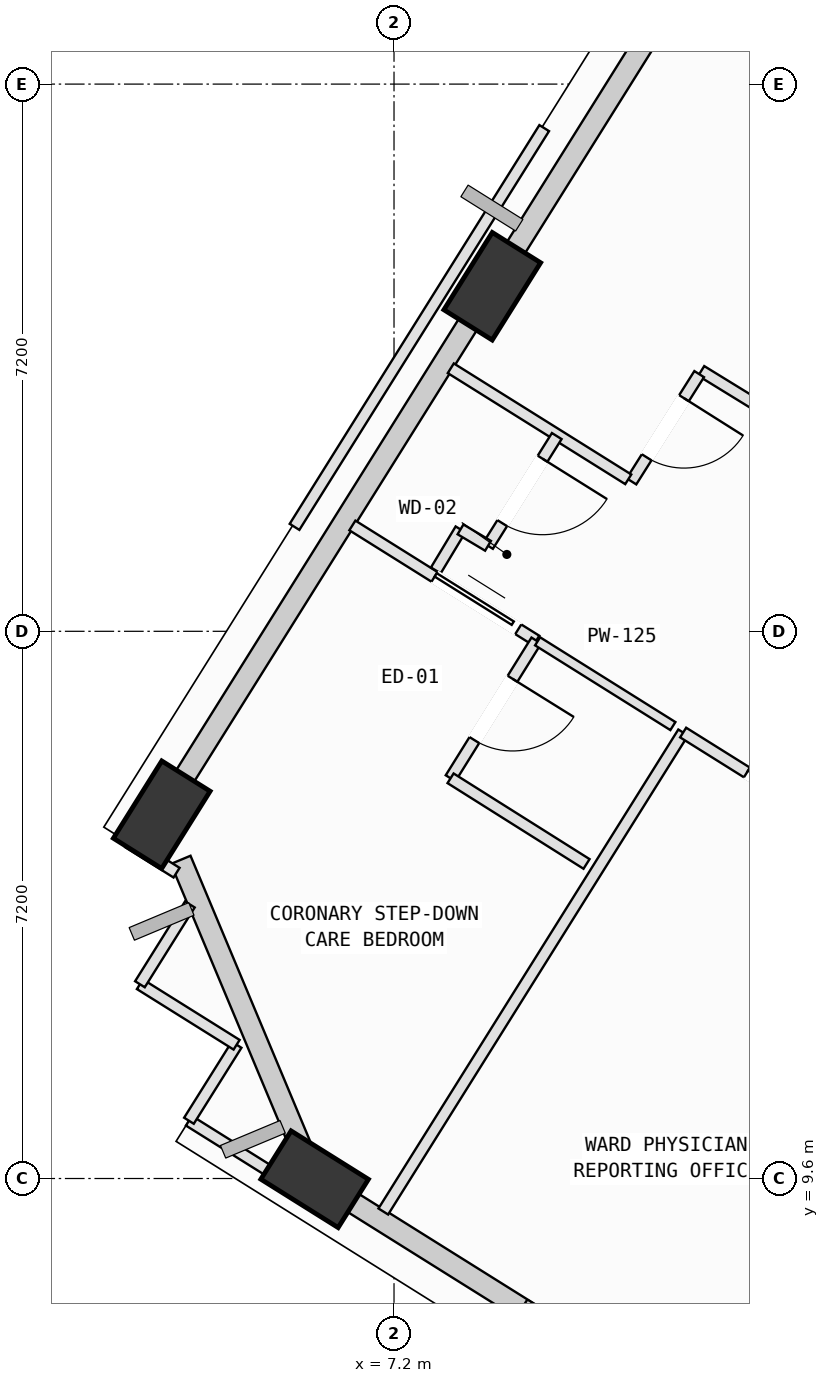
"""IFC4 building model, lengths in metres.
Left out: names, types, materials, properties, quantities, classifications, styles, units other than length and angle.
Written with IfcOpenShell. Run it as: python <this file> out.ifc"""

import sys

from ifc_helpers import new_model, si_unit, direction, frame, frame_2d, origin, origin_2d, place, context, subcontext, project, spatial, rectangle, extrude, element, fill, save


model = new_model("IFC4")
c1 = context("Model", 3, precision=1e-05, world=origin(), true_north=direction((0.0, 1.0)))
c2 = subcontext(c1, "Body", "Model", "MODEL_VIEW")
j1 = project(units=[si_unit("LENGTHUNIT", "METRE"), si_unit("PLANEANGLEUNIT", "RADIAN")], contexts=[c1])
p1 = place(None, origin())
s1 = spatial("IfcSite", under=j1, at=p1, CompositionType="ELEMENT")
p2 = place(p1, origin())
s2 = spatial("IfcBuilding", under=s1, at=p2, CompositionType="ELEMENT")
p3 = place(p2, frame((0.0, 0.0, 272.6)))
s3 = spatial("IfcBuildingStorey", under=s2, at=p3, CompositionType="ELEMENT", Elevation=272.6)
p4 = place(p3, frame((8.492, 21.34, 0.076), z_axis=(0.015107029766, -0.103396474218, 0.994525488246), x_axis=(0.403217157116, 0.910808249086, 0.088567813586)))
e1 = element("IfcColumn", 1, at=p4, inside=s3, PredefinedType="COLUMN", context=c2, shape_type="SweptSolid", body=[
    extrude(rectangle(XDim=1.2, YDim=0.75, at=origin_2d()), origin(), (0.0, 0.0, 1.0), 3.943),
])
p5 = place(p3, frame((4.144, 14.386, 0.093), z_axis=(0.043776072499, -0.120725231098, 0.991720259979), x_axis=(0.212333254316, 0.971116621815, 0.108844365708)))
e2 = element("IfcColumn", 2, at=p5, inside=s3, PredefinedType="COLUMN", context=c2, shape_type="SweptSolid", body=[
    extrude(rectangle(XDim=1.2, YDim=0.75, at=origin_2d()), origin(), (0.0, 0.0, 1.0), 3.938),
])
p6 = place(p3, frame((6.156, 9.59, 0.084), z_axis=(0.06340833724, -0.112341015051, 0.991644532635), x_axis=(-0.996784461674, 0.041648675863, 0.068455275645)))
e3 = element("IfcColumn", 3, at=p6, inside=s3, PredefinedType="COLUMN", context=c2, shape_type="SweptSolid", body=[
    extrude(rectangle(XDim=1.2, YDim=0.75, at=origin_2d()), origin(), (0.0, 0.0, 1.0), 3.947),
])
p7 = place(p3, frame((8.604, 21.529, 0.0), z_axis=(0.0, 0.0, 1.0), x_axis=(0.530668867354, 0.847579231235, 0.0)))
e4 = element("IfcWall", 4, at=p7, inside=s3, PredefinedType="SOLIDWALL", context=c2, shape_type="SweptSolid", body=[
    extrude(rectangle(XDim=7.434, YDim=0.28, at=frame_2d((3.717, 0.0))), origin(), (0.0, 0.0, 1.0), 3.265),
])
p8 = place(p3, frame((4.236, 14.552, 0.0), z_axis=(0.0, 0.0, 1.0), x_axis=(0.530664333184, 0.847582070059, 0.0)))
e5 = element("IfcWall", 5, at=p8, inside=s3, PredefinedType="SOLIDWALL", context=c2, shape_type="SweptSolid", body=[
    extrude(rectangle(XDim=7.485, YDim=0.28, at=frame_2d((3.742, 0.0))), origin(), (0.0, 0.0, 1.0), 3.265),
])
p9 = place(p3, frame((6.097, 9.727, 0.0), z_axis=(0.0, 0.0, 1.0), x_axis=(-0.386419734829, 0.922323039143, 0.0)))
e6 = element("IfcWall", 6, at=p9, inside=s3, PredefinedType="SOLIDWALL", context=c2, shape_type="SweptSolid", body=[
    extrude(rectangle(XDim=4.408, YDim=0.28, at=frame_2d((2.204, 0.0))), origin(), (0.0, 0.0, 1.0), 3.265),
])
p10 = place(p3, frame((11.606, 6.184, 0.0), z_axis=(0.0, 0.0, 1.0), x_axis=(-0.847576941241, 0.530672524893, 0.0)))
e7 = element("IfcWall", 7, at=p10, inside=s3, PredefinedType="SOLIDWALL", context=c2, shape_type="SweptSolid", body=[
    extrude(rectangle(XDim=5.83, YDim=0.28, at=frame_2d((2.915, 0.0))), origin(), (0.0, 0.0, 1.0), 2.765),
])
p11 = place(p10, frame((2.015, 0.0, 0.75)))
e8 = element("IfcOpeningElement", 8, at=p11, cuts=e7, PredefinedType="OPENING", context=c2, shape_type="SweptSolid", body=[
    extrude(rectangle(XDim=1.2, YDim=1.75, at=frame_2d((0.6, 0.875))), frame((0.0, 0.15, 0.0), z_axis=(0.0, -1.0, 0.0), x_axis=(1.0, 0.0, 0.0)), (0.0, 0.0, 1.0), 0.3),
])
p12 = place(p3, frame((7.059, 9.166, 0.0), z_axis=(0.0, 0.0, 1.0), x_axis=(0.530586195895, 0.847630986176, 0.0)))
e9 = element("IfcWall", 9, at=p12, inside=s3, PredefinedType="PARTITIONING", context=c2, shape_type="SweptSolid", body=[
    extrude(rectangle(XDim=7.435, YDim=0.15, at=frame_2d((3.717, 0.0))), origin(), (0.0, 0.0, 1.0), 3.415),
])
p13 = place(p3, frame((11.004, 15.468, 0.0), z_axis=(0.0, 0.0, 1.0), x_axis=(0.847668872786, -0.530525665836, 0.0)))
e10 = element("IfcWall", 10, at=p13, inside=s3, PredefinedType="PARTITIONING", context=c2, shape_type="SweptSolid", body=[
    extrude(rectangle(XDim=3.374, YDim=0.15, at=frame_2d((1.687, 0.0))), origin(), (0.0, 0.0, 1.0), 3.78),
])
p14 = place(p13, frame((0.99, 0.0, 0.0)))
e11 = element("IfcOpeningElement", 11, at=p14, cuts=e10, PredefinedType="OPENING", context=c2, shape_type="SweptSolid", body=[
    extrude(rectangle(XDim=1.2, YDim=2.15, at=frame_2d((0.6, 1.075))), frame((0.0, 0.085, 0.0), z_axis=(0.0, -1.0, 0.0), x_axis=(1.0, 0.0, 0.0)), (0.0, 0.0, 1.0), 0.17),
])
p15 = place(p3, frame((4.339, 13.624, 0.0), z_axis=(0.0, 0.0, 1.0), x_axis=(-0.847357103452, 0.531023482748, 0.0)))
e12 = element("IfcWall", 12, at=p15, inside=s3, PredefinedType="PARTITIONING", context=c2, shape_type="SweptSolid", body=[
    extrude(rectangle(XDim=0.75, YDim=0.15, at=frame_2d((0.375, 0.0))), origin(), (0.0, 0.0, 1.0), 3.78),
])
p16 = place(p3, frame((3.704, 14.022, 0.0), z_axis=(0.0, 0.0, 1.0), x_axis=(0.530358912713, 0.847773214784, 0.0)))
e13 = element("IfcWall", 13, at=p16, inside=s3, PredefinedType="PARTITIONING", context=c2, shape_type="SweptSolid", body=[
    extrude(rectangle(XDim=0.731, YDim=0.15, at=frame_2d((0.366, 0.0))), origin(), (0.0, 0.0, 1.0), 3.78),
])
p17 = place(p3, frame((6.652, 18.193, 0.0), z_axis=(0.0, 0.0, 1.0), x_axis=(0.847575288096, -0.530675165246, 0.0)))
e14 = element("IfcWall", 14, at=p17, inside=s3, PredefinedType="PARTITIONING", context=c2, shape_type="SweptSolid", body=[
    extrude(rectangle(XDim=2.855, YDim=0.15, at=frame_2d((1.428, 0.0))), origin(), (0.0, 0.0, 1.0), 3.78),
])
p18 = place(p17, frame((1.275, 0.0, 0.0)))
e15 = element("IfcOpeningElement", 15, at=p18, cuts=e14, PredefinedType="OPENING", context=c2, shape_type="SweptSolid", body=[
    extrude(rectangle(XDim=1.3, YDim=2.15, at=frame_2d((0.65, 1.075))), frame((0.0, 0.085, 0.0), z_axis=(0.0, -1.0, 0.0), x_axis=(1.0, 0.0, 0.0)), (0.0, 0.0, 1.0), 0.17),
])
p19 = place(p3, frame((9.072, 16.678, 0.0), z_axis=(0.0, 0.0, 1.0), x_axis=(-0.528455802258, -0.848960814796, 0.0)))
e16 = element("IfcWall", 16, at=p19, inside=s3, PredefinedType="PARTITIONING", context=c2, shape_type="SweptSolid", body=[
    extrude(rectangle(XDim=2.134, YDim=0.15, at=frame_2d((1.067, 0.0))), origin(), (0.0, 0.0, 1.0), 3.78),
])
p20 = place(p19, frame((0.592, 0.0, 0.0)))
e17 = element("IfcOpeningElement", 17, at=p20, cuts=e16, PredefinedType="OPENING", context=c2, shape_type="SweptSolid", body=[
    extrude(rectangle(XDim=0.95, YDim=2.1, at=frame_2d((0.475, 1.05))), frame((0.0, 0.085, 0.0), z_axis=(0.0, -1.0, 0.0), x_axis=(1.0, 0.0, 0.0)), (0.0, 0.0, 1.0), 0.17),
])
p21 = place(p3, frame((7.944, 14.866, 0.0), z_axis=(0.0, 0.0, 1.0), x_axis=(0.846092038833, -0.533036829706, 0.0)))
e18 = element("IfcWall", 18, at=p21, inside=s3, PredefinedType="PARTITIONING", context=c2, shape_type="SweptSolid", body=[
    extrude(rectangle(XDim=2.114, YDim=0.15, at=frame_2d((1.057, 0.0))), origin(), (0.0, 0.0, 1.0), 3.78),
])
p22 = place(p3, frame((6.542, 9.083, 0.0), z_axis=(0.0, 0.0, 1.0), x_axis=(-0.847610563835, 0.53061881994, 0.0)))
e19 = element("IfcWall", 19, at=p22, inside=s3, PredefinedType="PARTITIONING", context=c2, shape_type="SweptSolid", body=[
    extrude(rectangle(XDim=2.407, YDim=0.15, at=frame_2d((1.203, 0.0))), origin(), (0.0, 0.0, 1.0), 2.765),
])
p23 = place(p3, frame((4.502, 10.36, 0.0), z_axis=(0.0, 0.0, 1.0), x_axis=(0.531188381302, 0.84725374214, 0.0)))
e20 = element("IfcWall", 20, at=p23, inside=s3, PredefinedType="PARTITIONING", context=c2, shape_type="SweptSolid", body=[
    extrude(rectangle(XDim=1.18, YDim=0.15, at=frame_2d((0.59, 0.0))), origin(), (0.0, 0.0, 1.0), 3.78),
])
p24 = place(p3, frame((5.129, 11.36, 0.0), z_axis=(0.0, 0.0, 1.0), x_axis=(-0.847723958582, 0.530437640111, 0.0)))
e21 = element("IfcWall", 21, at=p24, inside=s3, PredefinedType="PARTITIONING", context=c2, shape_type="SweptSolid", body=[
    extrude(rectangle(XDim=1.5, YDim=0.15, at=frame_2d((0.75, 0.0))), origin(), (0.0, 0.0, 1.0), 3.78),
])
p25 = place(p3, frame((3.857, 12.156, 0.0), z_axis=(0.0, 0.0, 1.0), x_axis=(0.530406374344, 0.847743521388, 0.0)))
e22 = element("IfcWall", 22, at=p25, inside=s3, PredefinedType="PARTITIONING", context=c2, shape_type="SweptSolid", body=[
    extrude(rectangle(XDim=1.239, YDim=0.15, at=frame_2d((0.619, 0.0))), origin(), (0.0, 0.0, 1.0), 3.78),
])
p26 = place(p3, frame((9.089, 16.668, 0.0), z_axis=(0.0, 0.0, 1.0), x_axis=(0.847436188004, -0.530897266202, 0.0)))
e23 = element("IfcWall", 23, at=p26, inside=s3, PredefinedType="PARTITIONING", context=c2, shape_type="SweptSolid", body=[
    extrude(rectangle(XDim=2.1, YDim=0.125, at=frame_2d((1.05, 0.0))), origin(), (0.0, 0.0, 1.0), 3.78),
])
p27 = place(p3, frame((12.42, 19.502, 0.0), z_axis=(0.0, 0.0, 1.0), x_axis=(-0.851912829568, 0.523683617098, 0.0)))
e24 = element("IfcWall", 24, at=p27, inside=s3, PredefinedType="PARTITIONING", context=c2, shape_type="SweptSolid", body=[
    extrude(rectangle(XDim=1.383, YDim=0.15, at=frame_2d((0.691, 0.0))), origin(), (0.0, 0.0, 1.0), 3.78),
])
p28 = place(p3, frame((11.215, 20.184, 0.0), z_axis=(0.0, 0.0, 1.0), x_axis=(-0.533937952573, -0.845523661882, 0.0)))
e25 = element("IfcWall", 25, at=p28, inside=s3, PredefinedType="PARTITIONING", context=c2, shape_type="SweptSolid", body=[
    extrude(rectangle(XDim=1.669, YDim=0.15, at=frame_2d((0.834, 0.0))), origin(), (0.0, 0.0, 1.0), 3.78),
])
p29 = place(p28, frame((0.375, 0.0, 0.0)))
e26 = element("IfcOpeningElement", 26, at=p29, cuts=e25, PredefinedType="OPENING", context=c2, shape_type="SweptSolid", body=[
    extrude(rectangle(XDim=0.92, YDim=2.1, at=frame_2d((0.46, 1.05))), frame((0.0, 0.085, 0.0), z_axis=(0.0, -1.0, 0.0), x_axis=(1.0, 0.0, 0.0)), (0.0, 0.0, 1.0), 0.17),
])
p30 = place(p3, frame((10.282, 18.8, 0.0), z_axis=(0.0, 0.0, 1.0), x_axis=(-0.847739258665, 0.530413187354, 0.0)))
e27 = element("IfcWall", 27, at=p30, inside=s3, PredefinedType="PARTITIONING", context=c2, shape_type="SweptSolid", body=[
    extrude(rectangle(XDim=2.754, YDim=0.15, at=frame_2d((1.377, 0.0))), origin(), (0.0, 0.0, 1.0), 3.78),
])
p31 = place(p3, frame((8.047, 20.997, 0.0), z_axis=(0.0, 0.0, 1.0), x_axis=(0.531408304338, 0.847115820937, 0.0)))
e28 = element("IfcWall", 28, at=p31, inside=s3, PredefinedType="PARTITIONING", context=c2, shape_type="SweptSolid", body=[
    extrude(rectangle(XDim=0.747, YDim=0.15, at=frame_2d((0.374, 0.0))), origin(), (0.0, 0.0, 1.0), 3.78),
])
p32 = place(p3, frame((8.075, 18.141, 0.0), z_axis=(0.0, 0.0, 1.0), x_axis=(-0.515577678188, -0.85684284309, 0.0)))
e29 = element("IfcWall", 29, at=p32, inside=s3, PredefinedType="PARTITIONING", context=c2, shape_type="SweptSolid", body=[
    extrude(rectangle(XDim=0.63, YDim=0.15, at=frame_2d((0.315, 0.0))), origin(), (0.0, 0.0, 1.0), 3.78),
])
p33 = place(p3, frame((5.891, 18.174, 0.0), z_axis=(0.0, 0.0, 1.0), x_axis=(0.530654624603, 0.847588148447, 0.0)))
e30 = element("IfcWall", 30, at=p33, inside=s3, PredefinedType="PARTITIONING", context=c2, shape_type="SweptSolid", body=[
    extrude(rectangle(XDim=6.19, YDim=0.15, at=frame_2d((3.095, 0.0))), origin(), (0.0, 0.0, 1.0), 3.78),
])
p34 = place(p3, frame((9.341, 19.369, 0.0), z_axis=(0.0, 0.0, 1.0), x_axis=(-0.530694401654, -0.847563243689, 0.0)))
e31 = element("IfcWall", 31, at=p34, inside=s3, PredefinedType="PARTITIONING", context=c2, shape_type="SweptSolid", body=[
    extrude(rectangle(XDim=1.704, YDim=0.15, at=frame_2d((0.852, 0.0))), origin(), (0.0, 0.0, 1.0), 3.78),
])
p35 = place(p34, frame((0.352, 0.0, 0.0)))
e32 = element("IfcOpeningElement", 32, at=p35, cuts=e31, PredefinedType="OPENING", context=c2, shape_type="SweptSolid", body=[
    extrude(rectangle(XDim=1.0, YDim=2.12, at=frame_2d((0.5, 1.06))), frame((0.0, 0.085, 0.0), z_axis=(0.0, -1.0, 0.0), x_axis=(1.0, 0.0, 0.0)), (0.0, 0.0, 1.0), 0.17),
])
p36 = place(p3, frame((8.437, 17.925, 0.0), z_axis=(0.0, 0.0, 1.0), x_axis=(-0.858716693244, 0.512450622738, 0.0)))
e33 = element("IfcWall", 33, at=p36, inside=s3, PredefinedType="PARTITIONING", context=c2, shape_type="SweptSolid", body=[
    extrude(rectangle(XDim=0.422, YDim=0.15, at=frame_2d((0.211, 0.0))), origin(), (0.0, 0.0, 1.0), 3.78),
])
p37 = place(p14, origin())
e34 = element("IfcDoor", 34, at=p37, inside=s3, OperationType="SINGLE_SWING_LEFT", PredefinedType="DOOR", context=c2, shape_type="SweptSolid", body=[
    extrude(rectangle(XDim=1.2, YDim=2.15, at=frame_2d((0.6, 1.075))), frame((0.0, 0.025, 0.0), z_axis=(0.0, -1.0, 0.0), x_axis=(1.0, 0.0, 0.0)), (0.0, 0.0, 1.0), 0.05),
])
fill(e11, e34)
p38 = place(p18, origin())
e35 = element("IfcDoor", 35, at=p38, inside=s3, OperationType="SLIDING_TO_LEFT", PredefinedType="DOOR", context=c2, shape_type="SweptSolid", body=[
    extrude(rectangle(XDim=1.3, YDim=2.15, at=frame_2d((0.65, 1.075))), frame((0.0, 0.025, 0.0), z_axis=(0.0, -1.0, 0.0), x_axis=(1.0, 0.0, 0.0)), (0.0, 0.0, 1.0), 0.05),
])
fill(e15, e35)
p39 = place(p20, origin())
e36 = element("IfcDoor", 36, at=p39, inside=s3, OperationType="SINGLE_SWING_LEFT", PredefinedType="DOOR", context=c2, shape_type="SweptSolid", body=[
    extrude(rectangle(XDim=0.95, YDim=2.1, at=frame_2d((0.475, 1.05))), frame((0.0, 0.025, 0.0), z_axis=(0.0, -1.0, 0.0), x_axis=(1.0, 0.0, 0.0)), (0.0, 0.0, 1.0), 0.05),
])
fill(e17, e36)
p40 = place(p29, origin())
e37 = element("IfcDoor", 37, at=p40, inside=s3, OperationType="SINGLE_SWING_LEFT", PredefinedType="DOOR", context=c2, shape_type="SweptSolid", body=[
    extrude(rectangle(XDim=0.92, YDim=2.1, at=frame_2d((0.46, 1.05))), frame((0.0, 0.025, 0.0), z_axis=(0.0, -1.0, 0.0), x_axis=(1.0, 0.0, 0.0)), (0.0, 0.0, 1.0), 0.05),
])
fill(e26, e37)
p41 = place(p35, origin())
e38 = element("IfcDoor", 38, at=p41, inside=s3, OperationType="SINGLE_SWING_LEFT", PredefinedType="DOOR", context=c2, shape_type="SweptSolid", body=[
    extrude(rectangle(XDim=1.0, YDim=2.12, at=frame_2d((0.5, 1.06))), frame((0.0, 0.025, 0.0), z_axis=(0.0, -1.0, 0.0), x_axis=(1.0, 0.0, 0.0)), (0.0, 0.0, 1.0), 0.05),
])
fill(e32, e38)
save(model, sys.argv[1])
